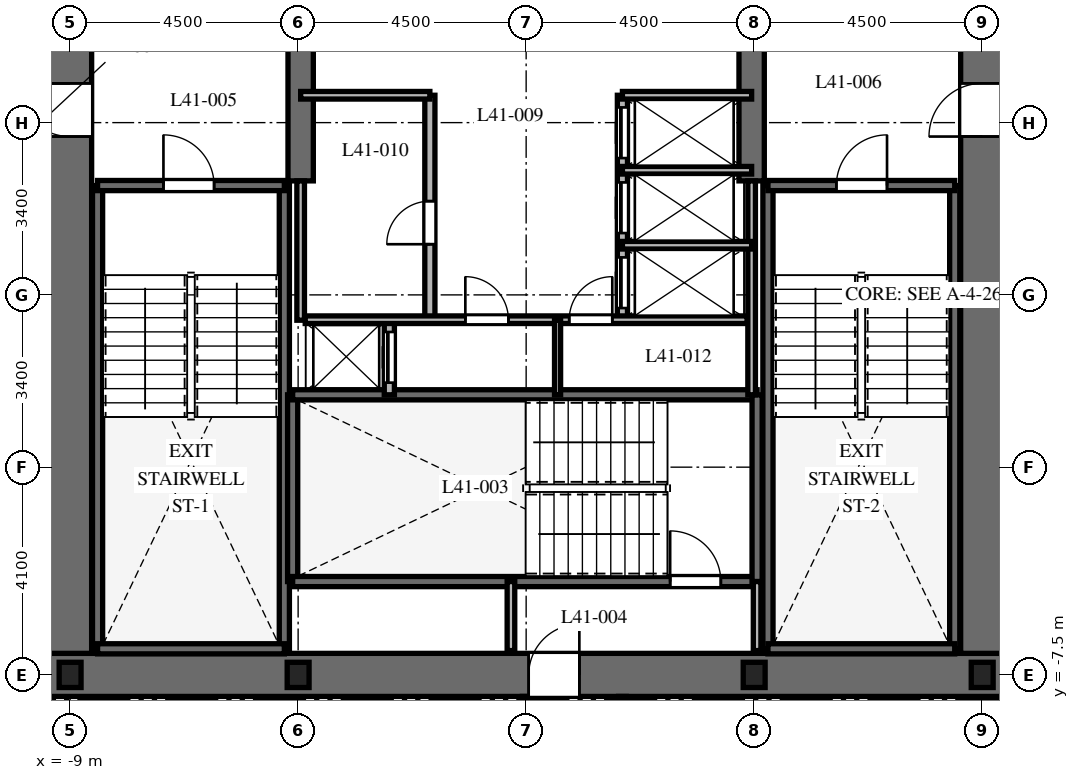
"""IFC4 building model, lengths in metres.
Left out: names, types, materials, properties, quantities, classifications, styles, units other than length and angle.
Written with IfcOpenShell. Run it as: python <this file> out.ifc"""

import sys

from ifc_helpers import new_model, si_unit, direction, frame, frame_2d, origin, origin_2d, place, context, subcontext, project, spatial, rectangle, i_section, extrude, element, fill, save


model = new_model("IFC4")
c1 = context("Model", 3, precision=1e-05, world=origin(), true_north=direction((0.0, 1.0)))
c2 = subcontext(c1, "Body", "Model", "MODEL_VIEW")
j1 = project(units=[si_unit("LENGTHUNIT", "METRE"), si_unit("PLANEANGLEUNIT", "RADIAN")], contexts=[c1])
p1 = place(None, origin())
s1 = spatial("IfcSite", under=j1, at=p1, CompositionType="ELEMENT")
p2 = place(p1, origin())
s2 = spatial("IfcBuilding", under=s1, at=p2, CompositionType="ELEMENT")
p3 = place(p2, frame((0.0, 0.0, 166.5)))
s3 = spatial("IfcBuildingStorey", under=s2, at=p3, CompositionType="ELEMENT", Elevation=166.5)
p4 = place(p3, frame((-9.425, -7.5, 0.0), z_axis=(0.0, 0.0, 1.0), x_axis=(1.0, 0.0, 0.0)))
e1 = element("IfcWall", 1, at=p4, inside=s3, PredefinedType="SHEAR", context=c2, shape_type="SweptSolid", body=[
    extrude(rectangle(XDim=18.85, YDim=0.85, at=frame_2d((9.425, 0.0))), origin(), (0.0, 0.0, 1.0), 3.7),
])
p5 = place(p4, frame((9.475, 0.0, 0.0)))
e2 = element("IfcOpeningElement", 2, at=p5, cuts=e1, PredefinedType="OPENING", context=c2, shape_type="SweptSolid", body=[
    extrude(rectangle(XDim=1.0, YDim=2.15, at=frame_2d((0.5, 1.075))), frame((0.0, 0.435, 0.0), z_axis=(0.0, -1.0, 0.0), x_axis=(1.0, 0.0, 0.0)), (0.0, 0.0, 1.0), 0.87),
])
p6 = place(p3, frame((-9.0, -7.075, 0.0), z_axis=(0.0, 0.0, 1.0), x_axis=(0.0, 1.0, 0.0)))
e3 = element("IfcWall", 3, at=p6, inside=s3, PredefinedType="SHEAR", context=c2, shape_type="SweptSolid", body=[
    extrude(rectangle(XDim=14.15, YDim=0.85, at=frame_2d((7.075, 0.0))), origin(), (0.0, 0.0, 1.0), 3.7),
])
p7 = place(p6, frame((10.2, 0.0, 0.0)))
e4 = element("IfcOpeningElement", 4, at=p7, cuts=e3, PredefinedType="OPENING", context=c2, shape_type="SweptSolid", body=[
    extrude(rectangle(XDim=1.05, YDim=2.15, at=frame_2d((0.525, 1.075))), frame((0.0, 0.435, 0.0), z_axis=(0.0, -1.0, 0.0), x_axis=(1.0, 0.0, 0.0)), (0.0, 0.0, 1.0), 0.87),
])
p8 = place(p3, frame((9.0, -7.075, 0.0), z_axis=(0.0, 0.0, 1.0), x_axis=(0.0, 1.0, 0.0)))
e5 = element("IfcWall", 5, at=p8, inside=s3, PredefinedType="SHEAR", context=c2, shape_type="SweptSolid", body=[
    extrude(rectangle(XDim=14.15, YDim=0.85, at=frame_2d((7.075, 0.0))), origin(), (0.0, 0.0, 1.0), 3.7),
])
p9 = place(p8, frame((10.2, 0.0, 0.0)))
e6 = element("IfcOpeningElement", 6, at=p9, cuts=e5, PredefinedType="OPENING", context=c2, shape_type="SweptSolid", body=[
    extrude(rectangle(XDim=1.05, YDim=2.15, at=frame_2d((0.525, 1.075))), frame((0.0, 0.435, 0.0), z_axis=(0.0, -1.0, 0.0), x_axis=(1.0, 0.0, 0.0)), (0.0, 0.0, 1.0), 0.87),
])
for number, where, z_axis, x_axis in (
    (7, (-4.45, 2.25, 0.0), (0.0, 0.0, 1.0), (0.0, 1.0, 0.0)),
    (8, (4.45, 2.25, 0.0), (0.0, 0.0, 1.0), (0.0, 1.0, 0.0)),
):
    element("IfcWall", number, at=place(p3, frame(where, z_axis=z_axis, x_axis=x_axis)), inside=s3, PredefinedType="SHEAR", context=c2, shape_type="SweptSolid", body=[
        extrude(rectangle(XDim=4.825, YDim=0.5, at=frame_2d((2.413, 0.0))), origin(), (0.0, 0.0, 1.0), 3.7),
    ])
for number, where, z_axis, x_axis in (
    (9, (-8.458, -6.985, 0.0), (0.0, 0.0, 1.0), (0.0, 1.0, 0.0)),
    (10, (-4.772, -6.985, 0.0), (0.0, 0.0, 1.0), (0.0, 1.0, 0.0)),
):
    element("IfcWall", number, at=place(p3, frame(where, z_axis=z_axis, x_axis=x_axis)), inside=s3, PredefinedType="SHEAR", context=c2, shape_type="SweptSolid", body=[
        extrude(rectangle(XDim=9.143, YDim=0.2, at=frame_2d((4.572, 0.0))), origin(), (0.0, 0.0, 1.0), 3.7),
    ])
p10 = place(p3, frame((-8.458, -6.985, 0.0), z_axis=(0.0, 0.0, 1.0), x_axis=(1.0, 0.0, 0.0)))
e11 = element("IfcWall", 11, at=p10, inside=s3, PredefinedType="SHEAR", context=c2, shape_type="SweptSolid", body=[
    extrude(rectangle(XDim=3.686, YDim=0.2, at=frame_2d((1.843, 0.0))), origin(), (0.0, 0.0, 1.0), 3.7),
])
p11 = place(p3, frame((-8.458, 2.158, 0.0), z_axis=(0.0, 0.0, 1.0), x_axis=(1.0, 0.0, 0.0)))
e12 = element("IfcWall", 12, at=p11, inside=s3, PredefinedType="SHEAR", context=c2, shape_type="SweptSolid", body=[
    extrude(rectangle(XDim=3.686, YDim=0.2, at=frame_2d((1.843, 0.0))), origin(), (0.0, 0.0, 1.0), 3.7),
])
p12 = place(p11, frame((1.3, 0.0, 0.0)))
e13 = element("IfcOpeningElement", 13, at=p12, cuts=e12, PredefinedType="OPENING", context=c2, shape_type="SweptSolid", body=[
    extrude(rectangle(XDim=1.0, YDim=2.15, at=frame_2d((0.5, 1.075))), frame((0.0, 0.11, 0.0), z_axis=(0.0, -1.0, 0.0), x_axis=(1.0, 0.0, 0.0)), (0.0, 0.0, 1.0), 0.22),
])
for number, where, z_axis, x_axis in (
    (14, (4.772, -6.985, 0.0), (0.0, 0.0, 1.0), (0.0, 1.0, 0.0)),
    (15, (8.458, -6.985, 0.0), (0.0, 0.0, 1.0), (0.0, 1.0, 0.0)),
):
    element("IfcWall", number, at=place(p3, frame(where, z_axis=z_axis, x_axis=x_axis)), inside=s3, PredefinedType="SHEAR", context=c2, shape_type="SweptSolid", body=[
        extrude(rectangle(XDim=9.143, YDim=0.2, at=frame_2d((4.572, 0.0))), origin(), (0.0, 0.0, 1.0), 3.7),
    ])
p13 = place(p3, frame((4.772, -6.985, 0.0), z_axis=(0.0, 0.0, 1.0), x_axis=(1.0, 0.0, 0.0)))
e16 = element("IfcWall", 16, at=p13, inside=s3, PredefinedType="SHEAR", context=c2, shape_type="SweptSolid", body=[
    extrude(rectangle(XDim=3.686, YDim=0.2, at=frame_2d((1.843, 0.0))), origin(), (0.0, 0.0, 1.0), 3.7),
])
p14 = place(p3, frame((4.772, 2.158, 0.0), z_axis=(0.0, 0.0, 1.0), x_axis=(1.0, 0.0, 0.0)))
e17 = element("IfcWall", 17, at=p14, inside=s3, PredefinedType="SHEAR", context=c2, shape_type="SweptSolid", body=[
    extrude(rectangle(XDim=3.686, YDim=0.2, at=frame_2d((1.843, 0.0))), origin(), (0.0, 0.0, 1.0), 3.7),
])
p15 = place(p14, frame((1.35, 0.0, 0.0)))
e18 = element("IfcOpeningElement", 18, at=p15, cuts=e17, PredefinedType="OPENING", context=c2, shape_type="SweptSolid", body=[
    extrude(rectangle(XDim=1.0, YDim=2.15, at=frame_2d((0.5, 1.075))), frame((0.0, 0.11, 0.0), z_axis=(0.0, -1.0, 0.0), x_axis=(1.0, 0.0, 0.0)), (0.0, 0.0, 1.0), 0.22),
])
p16 = place(p3, frame((-4.608, -5.658, 0.0), z_axis=(0.0, 0.0, 1.0), x_axis=(0.0, 1.0, 0.0)))
e19 = element("IfcWall", 19, at=p16, inside=s3, PredefinedType="SHEAR", context=c2, shape_type="SweptSolid", body=[
    extrude(rectangle(XDim=3.686, YDim=0.2, at=frame_2d((1.843, 0.0))), origin(), (0.0, 0.0, 1.0), 3.7),
])
p17 = place(p3, frame((-4.608, -5.658, 0.0), z_axis=(0.0, 0.0, 1.0), x_axis=(1.0, 0.0, 0.0)))
e20 = element("IfcWall", 20, at=p17, inside=s3, PredefinedType="SHEAR", context=c2, shape_type="SweptSolid", body=[
    extrude(rectangle(XDim=9.166, YDim=0.2, at=frame_2d((4.583, 0.0))), origin(), (0.0, 0.0, 1.0), 3.7),
])
p18 = place(p17, frame((7.45, 0.0, 0.0)))
e21 = element("IfcOpeningElement", 21, at=p18, cuts=e20, PredefinedType="OPENING", context=c2, shape_type="SweptSolid", body=[
    extrude(rectangle(XDim=1.0, YDim=2.15, at=frame_2d((0.5, 1.075))), frame((0.0, 0.11, 0.0), z_axis=(0.0, -1.0, 0.0), x_axis=(1.0, 0.0, 0.0)), (0.0, 0.0, 1.0), 0.22),
])
p19 = place(p3, frame((-4.608, -1.972, 0.0), z_axis=(0.0, 0.0, 1.0), x_axis=(1.0, 0.0, 0.0)))
e22 = element("IfcWall", 22, at=p19, inside=s3, PredefinedType="SHEAR", context=c2, shape_type="SweptSolid", body=[
    extrude(rectangle(XDim=9.166, YDim=0.2, at=frame_2d((4.583, 0.0))), origin(), (0.0, 0.0, 1.0), 3.7),
])
p20 = place(p3, frame((4.558, -5.658, 0.0), z_axis=(0.0, 0.0, 1.0), x_axis=(0.0, 1.0, 0.0)))
e23 = element("IfcWall", 23, at=p20, inside=s3, PredefinedType="SHEAR", context=c2, shape_type="SweptSolid", body=[
    extrude(rectangle(XDim=3.686, YDim=0.2, at=frame_2d((1.843, 0.0))), origin(), (0.0, 0.0, 1.0), 3.7),
])
for number, where, z_axis, x_axis in (
    (24, (-9.0, -7.5, 0.0), (0.0, 0.0, 1.0), (1.0, 0.0, 0.0)),
    (25, (-4.5, -7.5, 0.0), (0.0, 0.0, 1.0), (1.0, 0.0, 0.0)),
    (26, (4.5, -7.5, 0.0), (0.0, 0.0, 1.0), (1.0, 0.0, 0.0)),
    (27, (9.0, -7.5, 0.0), (0.0, 0.0, 1.0), (1.0, 0.0, 0.0)),
):
    element("IfcColumn", number, at=place(p3, frame(where, z_axis=z_axis, x_axis=x_axis)), inside=s3, PredefinedType="COLUMN", context=c2, shape_type="SweptSolid", body=[
        extrude(i_section(OverallWidth=0.432, OverallDepth=0.498, WebThickness=0.056, FlangeThickness=0.089, at=origin_2d()), origin(), (0.0, 0.0, 1.0), 3.7),
    ])
for number, where, z_axis, x_axis in (
    (28, (-0.3, -7.02, 0.0), (0.0, 0.0, 1.0), (0.0, 1.0, 0.0)),
    (29, (4.558, -7.02, 0.0), (0.0, 0.0, 1.0), (0.0, 1.0, 0.0)),
):
    element("IfcWall", number, at=place(p3, frame(where, z_axis=z_axis, x_axis=x_axis)), inside=s3, PredefinedType="PARTITIONING", context=c2, shape_type="SweptSolid", body=[
        extrude(rectangle(XDim=1.362, YDim=0.15, at=frame_2d((0.681, 0.0))), origin(), (0.0, 0.0, 1.0), 3.38),
    ])
p21 = place(p3, frame((-2.7, -1.972, 0.0), z_axis=(0.0, 0.0, 1.0), x_axis=(0.0, 1.0, 0.0)))
e30 = element("IfcWall", 30, at=p21, inside=s3, PredefinedType="PARTITIONING", context=c2, shape_type="SweptSolid", body=[
    extrude(rectangle(XDim=1.472, YDim=0.2, at=frame_2d((0.736, 0.0))), origin(), (0.0, 0.0, 1.0), 3.38),
])
p22 = place(p21, frame((0.24, 0.0, 0.0)))
e31 = element("IfcOpeningElement", 31, at=p22, cuts=e30, PredefinedType="OPENING", context=c2, shape_type="SweptSolid", body=[
    extrude(rectangle(XDim=1.0, YDim=2.2, at=frame_2d((0.5, 1.1))), frame((0.0, 0.11, 0.0), z_axis=(0.0, -1.0, 0.0), x_axis=(1.0, 0.0, 0.0)), (0.0, 0.0, 1.0), 0.22),
])
p23 = place(p3, frame((-4.45, -0.5, 0.0), z_axis=(0.0, 0.0, 1.0), x_axis=(0.0, 1.0, 0.0)))
e32 = element("IfcWall", 32, at=p23, inside=s3, PredefinedType="PARTITIONING", context=c2, shape_type="SweptSolid", body=[
    extrude(rectangle(XDim=2.75, YDim=0.15, at=frame_2d((1.375, 0.0))), origin(), (0.0, 0.0, 1.0), 3.38),
])
p24 = place(p3, frame((4.45, -1.972, 0.0), z_axis=(0.0, 0.0, 1.0), x_axis=(0.0, 1.0, 0.0)))
e33 = element("IfcWall", 33, at=p24, inside=s3, PredefinedType="PARTITIONING", context=c2, shape_type="SweptSolid", body=[
    extrude(rectangle(XDim=4.222, YDim=0.15, at=frame_2d((2.111, 0.0))), origin(), (0.0, 0.0, 1.0), 3.38),
])
p25 = place(p3, frame((-1.9, -0.5, 0.0), z_axis=(0.0, 0.0, 1.0), x_axis=(0.0, 1.0, 0.0)))
e34 = element("IfcWall", 34, at=p25, inside=s3, PredefinedType="PARTITIONING", context=c2, shape_type="SweptSolid", body=[
    extrude(rectangle(XDim=4.44, YDim=0.2, at=frame_2d((2.22, 0.0))), origin(), (0.0, 0.0, 1.0), 3.38),
])
p26 = place(p25, frame((1.5, 0.0, 0.0)))
e35 = element("IfcOpeningElement", 35, at=p26, cuts=e34, PredefinedType="OPENING", context=c2, shape_type="SweptSolid", body=[
    extrude(rectangle(XDim=0.85, YDim=2.03, at=frame_2d((0.425, 1.015))), frame((0.0, 0.11, 0.0), z_axis=(0.0, -1.0, 0.0), x_axis=(1.0, 0.0, 0.0)), (0.0, 0.0, 1.0), 0.22),
])
p27 = place(p3, frame((-4.45, 3.94, 0.0), z_axis=(0.0, 0.0, 1.0), x_axis=(1.0, 0.0, 0.0)))
e36 = element("IfcWall", 36, at=p27, inside=s3, PredefinedType="PARTITIONING", context=c2, shape_type="SweptSolid", body=[
    extrude(rectangle(XDim=2.55, YDim=0.15, at=frame_2d((1.275, 0.0))), origin(), (0.0, 0.0, 1.0), 3.38),
])
p28 = place(p3, frame((1.9, -0.5, 0.0), z_axis=(0.0, 0.0, 1.0), x_axis=(0.0, 1.0, 0.0)))
e37 = element("IfcWall", 37, at=p28, inside=s3, PredefinedType="PARTITIONING", context=c2, shape_type="SweptSolid", body=[
    extrude(rectangle(XDim=4.44, YDim=0.2, at=frame_2d((2.22, 0.0))), origin(), (0.0, 0.0, 1.0), 3.38),
])
p29 = place(p28, frame((0.24, 0.0, 0.0)))
e38 = element("IfcOpeningElement", 38, at=p29, cuts=e37, PredefinedType="OPENING", context=c2, shape_type="SweptSolid", body=[
    extrude(rectangle(XDim=1.0, YDim=2.2, at=frame_2d((0.5, 1.1))), frame((0.0, 0.11, 0.0), z_axis=(0.0, -1.0, 0.0), x_axis=(1.0, 0.0, 0.0)), (0.0, 0.0, 1.0), 0.22),
])
p30 = place(p28, frame((1.72, 0.0, 0.0)))
e39 = element("IfcOpeningElement", 39, at=p30, cuts=e37, PredefinedType="OPENING", context=c2, shape_type="SweptSolid", body=[
    extrude(rectangle(XDim=1.0, YDim=2.2, at=frame_2d((0.5, 1.1))), frame((0.0, 0.11, 0.0), z_axis=(0.0, -1.0, 0.0), x_axis=(1.0, 0.0, 0.0)), (0.0, 0.0, 1.0), 0.22),
])
p31 = place(p28, frame((3.2, 0.0, 0.0)))
e40 = element("IfcOpeningElement", 40, at=p31, cuts=e37, PredefinedType="OPENING", context=c2, shape_type="SweptSolid", body=[
    extrude(rectangle(XDim=1.0, YDim=2.2, at=frame_2d((0.5, 1.1))), frame((0.0, 0.11, 0.0), z_axis=(0.0, -1.0, 0.0), x_axis=(1.0, 0.0, 0.0)), (0.0, 0.0, 1.0), 0.22),
])
for number, where, z_axis, x_axis in (
    (41, (1.9, 3.94, 0.0), (0.0, 0.0, 1.0), (1.0, 0.0, 0.0)),
    (42, (1.9, 0.98, 0.0), (0.0, 0.0, 1.0), (1.0, 0.0, 0.0)),
    (43, (1.9, 2.46, 0.0), (0.0, 0.0, 1.0), (1.0, 0.0, 0.0)),
):
    element("IfcWall", number, at=place(p3, frame(where, z_axis=z_axis, x_axis=x_axis)), inside=s3, PredefinedType="PARTITIONING", context=c2, shape_type="SweptSolid", body=[
        extrude(rectangle(XDim=2.55, YDim=0.15, at=frame_2d((1.275, 0.0))), origin(), (0.0, 0.0, 1.0), 3.38),
    ])
p32 = place(p3, frame((-4.36, -0.49, 0.0), z_axis=(0.0, 0.0, 1.0), x_axis=(1.0, 0.0, 0.0)))
e44 = element("IfcWall", 44, at=p32, inside=s3, PredefinedType="PARTITIONING", context=c2, shape_type="SweptSolid", body=[
    extrude(rectangle(XDim=8.72, YDim=0.15, at=frame_2d((4.36, 0.0))), origin(), (0.0, 0.0, 1.0), 3.38),
])
p33 = place(p32, frame((3.16, 0.0, 0.0)))
e45 = element("IfcOpeningElement", 45, at=p33, cuts=e44, PredefinedType="OPENING", context=c2, shape_type="SweptSolid", body=[
    extrude(rectangle(XDim=0.85, YDim=2.03, at=frame_2d((0.425, 1.015))), frame((0.0, 0.085, 0.0), z_axis=(0.0, -1.0, 0.0), x_axis=(1.0, 0.0, 0.0)), (0.0, 0.0, 1.0), 0.17),
])
p34 = place(p32, frame((5.21, 0.0, 0.0)))
e46 = element("IfcOpeningElement", 46, at=p34, cuts=e44, PredefinedType="OPENING", context=c2, shape_type="SweptSolid", body=[
    extrude(rectangle(XDim=0.85, YDim=2.03, at=frame_2d((0.425, 1.015))), frame((0.0, 0.085, 0.0), z_axis=(0.0, -1.0, 0.0), x_axis=(1.0, 0.0, 0.0)), (0.0, 0.0, 1.0), 0.17),
])
p35 = place(p3, frame((0.62, -1.972, 0.0), z_axis=(0.0, 0.0, 1.0), x_axis=(0.0, 1.0, 0.0)))
e47 = element("IfcWall", 47, at=p35, inside=s3, PredefinedType="PARTITIONING", context=c2, shape_type="SweptSolid", body=[
    extrude(rectangle(XDim=1.472, YDim=0.12, at=frame_2d((0.736, 0.0))), origin(), (0.0, 0.0, 1.0), 3.38),
])
for number, where, z_axis, x_axis in (
    (48, (0.0, -10.05, 0.0), (0.0, 0.0, 1.0), (0.0, 1.0, 0.0)),
    (49, (1.9, -7.925, 0.0), (0.0, 0.0, 1.0), (0.0, -1.0, 0.0)),
):
    element("IfcWall", number, at=place(p3, frame(where, z_axis=z_axis, x_axis=x_axis)), inside=s3, PredefinedType="PARTITIONING", context=c2, shape_type="SweptSolid", body=[
        extrude(rectangle(XDim=2.125, YDim=0.15, at=frame_2d((1.062, 0.0))), origin(), (0.0, 0.0, 1.0), 3.38),
    ])
p36 = place(p12, origin())
e50 = element("IfcDoor", 50, at=p36, inside=s3, OperationType="SINGLE_SWING_LEFT", PredefinedType="DOOR", context=c2, shape_type="SweptSolid", body=[
    extrude(rectangle(XDim=1.0, YDim=2.15, at=frame_2d((0.5, 1.075))), frame((0.0, 0.025, 0.0), z_axis=(0.0, -1.0, 0.0), x_axis=(1.0, 0.0, 0.0)), (0.0, 0.0, 1.0), 0.05),
])
fill(e13, e50)
p37 = place(p15, origin())
e51 = element("IfcDoor", 51, at=p37, inside=s3, OperationType="SINGLE_SWING_RIGHT", PredefinedType="DOOR", context=c2, shape_type="SweptSolid", body=[
    extrude(rectangle(XDim=1.0, YDim=2.15, at=frame_2d((0.5, 1.075))), frame((0.0, 0.025, 0.0), z_axis=(0.0, -1.0, 0.0), x_axis=(1.0, 0.0, 0.0)), (0.0, 0.0, 1.0), 0.05),
])
fill(e18, e51)
p38 = place(p18, origin())
e52 = element("IfcDoor", 52, at=p38, inside=s3, OperationType="SINGLE_SWING_LEFT", PredefinedType="DOOR", context=c2, shape_type="SweptSolid", body=[
    extrude(rectangle(XDim=1.0, YDim=2.15, at=frame_2d((0.5, 1.075))), frame((0.0, 0.025, 0.0), z_axis=(0.0, -1.0, 0.0), x_axis=(1.0, 0.0, 0.0)), (0.0, 0.0, 1.0), 0.05),
])
fill(e21, e52)
p39 = place(p5, origin())
e53 = element("IfcDoor", 53, at=p39, inside=s3, OperationType="SINGLE_SWING_RIGHT", PredefinedType="DOOR", context=c2, shape_type="SweptSolid", body=[
    extrude(rectangle(XDim=1.0, YDim=2.15, at=frame_2d((0.5, 1.075))), frame((0.0, 0.025, 0.0), z_axis=(0.0, -1.0, 0.0), x_axis=(1.0, 0.0, 0.0)), (0.0, 0.0, 1.0), 0.05),
])
fill(e2, e53)
p40 = place(p7, origin())
e54 = element("IfcDoor", 54, at=p40, inside=s3, OperationType="SINGLE_SWING_RIGHT", PredefinedType="DOOR", context=c2, shape_type="SweptSolid", body=[
    extrude(rectangle(XDim=1.05, YDim=2.15, at=frame_2d((0.525, 1.075))), frame((0.0, 0.025, 0.0), z_axis=(0.0, -1.0, 0.0), x_axis=(1.0, 0.0, 0.0)), (0.0, 0.0, 1.0), 0.05),
])
fill(e4, e54)
p41 = place(p9, origin())
e55 = element("IfcDoor", 55, at=p41, inside=s3, OperationType="SINGLE_SWING_LEFT", PredefinedType="DOOR", context=c2, shape_type="SweptSolid", body=[
    extrude(rectangle(XDim=1.05, YDim=2.15, at=frame_2d((0.525, 1.075))), frame((0.0, 0.025, 0.0), z_axis=(0.0, -1.0, 0.0), x_axis=(1.0, 0.0, 0.0)), (0.0, 0.0, 1.0), 0.05),
])
fill(e6, e55)
p42 = place(p22, origin())
e56 = element("IfcDoor", 56, at=p42, inside=s3, OperationType="SLIDING_TO_LEFT", PredefinedType="DOOR", context=c2, shape_type="SweptSolid", body=[
    extrude(rectangle(XDim=1.0, YDim=2.2, at=frame_2d((0.5, 1.1))), frame((0.0, 0.025, 0.0), z_axis=(0.0, -1.0, 0.0), x_axis=(1.0, 0.0, 0.0)), (0.0, 0.0, 1.0), 0.05),
])
fill(e31, e56)
p43 = place(p26, origin())
e57 = element("IfcDoor", 57, at=p43, inside=s3, OperationType="SINGLE_SWING_LEFT", PredefinedType="DOOR", context=c2, shape_type="SweptSolid", body=[
    extrude(rectangle(XDim=0.85, YDim=2.03, at=frame_2d((0.425, 1.015))), frame((0.0, 0.025, 0.0), z_axis=(0.0, -1.0, 0.0), x_axis=(1.0, 0.0, 0.0)), (0.0, 0.0, 1.0), 0.05),
])
fill(e35, e57)
p44 = place(p29, origin())
e58 = element("IfcDoor", 58, at=p44, inside=s3, OperationType="SLIDING_TO_RIGHT", PredefinedType="DOOR", context=c2, shape_type="SweptSolid", body=[
    extrude(rectangle(XDim=1.0, YDim=2.2, at=frame_2d((0.5, 1.1))), frame((0.0, 0.025, 0.0), z_axis=(0.0, -1.0, 0.0), x_axis=(1.0, 0.0, 0.0)), (0.0, 0.0, 1.0), 0.05),
])
fill(e38, e58)
p45 = place(p30, origin())
e59 = element("IfcDoor", 59, at=p45, inside=s3, OperationType="SLIDING_TO_RIGHT", PredefinedType="DOOR", context=c2, shape_type="SweptSolid", body=[
    extrude(rectangle(XDim=1.0, YDim=2.2, at=frame_2d((0.5, 1.1))), frame((0.0, 0.025, 0.0), z_axis=(0.0, -1.0, 0.0), x_axis=(1.0, 0.0, 0.0)), (0.0, 0.0, 1.0), 0.05),
])
fill(e39, e59)
p46 = place(p31, origin())
e60 = element("IfcDoor", 60, at=p46, inside=s3, OperationType="SLIDING_TO_RIGHT", PredefinedType="DOOR", context=c2, shape_type="SweptSolid", body=[
    extrude(rectangle(XDim=1.0, YDim=2.2, at=frame_2d((0.5, 1.1))), frame((0.0, 0.025, 0.0), z_axis=(0.0, -1.0, 0.0), x_axis=(1.0, 0.0, 0.0)), (0.0, 0.0, 1.0), 0.05),
])
fill(e40, e60)
p47 = place(p33, origin())
e61 = element("IfcDoor", 61, at=p47, inside=s3, OperationType="SINGLE_SWING_LEFT", PredefinedType="DOOR", context=c2, shape_type="SweptSolid", body=[
    extrude(rectangle(XDim=0.85, YDim=2.03, at=frame_2d((0.425, 1.015))), frame((0.0, 0.025, 0.0), z_axis=(0.0, -1.0, 0.0), x_axis=(1.0, 0.0, 0.0)), (0.0, 0.0, 1.0), 0.05),
])
fill(e45, e61)
p48 = place(p34, origin())
e62 = element("IfcDoor", 62, at=p48, inside=s3, OperationType="SINGLE_SWING_RIGHT", PredefinedType="DOOR", context=c2, shape_type="SweptSolid", body=[
    extrude(rectangle(XDim=0.85, YDim=2.03, at=frame_2d((0.425, 1.015))), frame((0.0, 0.025, 0.0), z_axis=(0.0, -1.0, 0.0), x_axis=(1.0, 0.0, 0.0)), (0.0, 0.0, 1.0), 0.05),
])
fill(e46, e62)
save(model, sys.argv[1])
